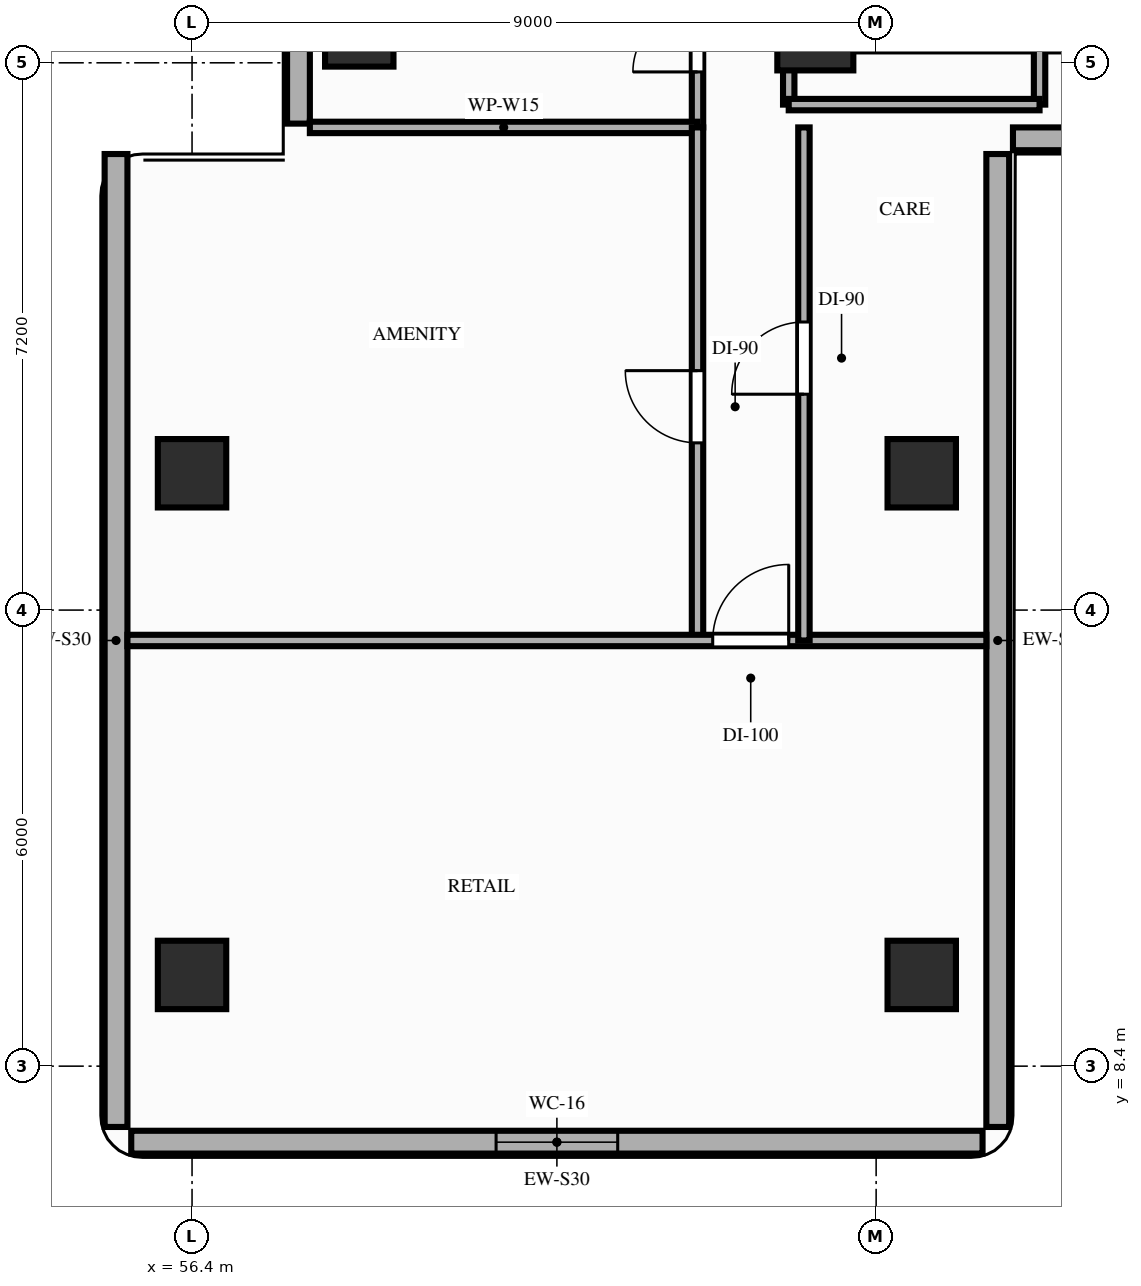
"""IFC4 building model, lengths in metres.
Left out: names, types, materials, properties, quantities, classifications, styles, units other than length and angle.
Written with IfcOpenShell. Run it as: python <this file> out.ifc"""

import sys

from ifc_helpers import new_model, si_unit, direction, frame, frame_2d, origin, origin_2d, place, context, subcontext, project, spatial, rectangle, extrude, element, fill, save


model = new_model("IFC4")
c1 = context("Model", 3, precision=1e-05, world=origin(), true_north=direction((0.0, 1.0)))
c2 = subcontext(c1, "Body", "Model", "MODEL_VIEW")
j1 = project(units=[si_unit("LENGTHUNIT", "METRE"), si_unit("PLANEANGLEUNIT", "RADIAN")], contexts=[c1])
p1 = place(None, origin())
s1 = spatial("IfcSite", under=j1, at=p1, CompositionType="ELEMENT")
p2 = place(p1, origin())
s2 = spatial("IfcBuilding", under=s1, at=p2, CompositionType="ELEMENT")
p3 = place(p2, frame((0.0, 0.0, 72.4)))
s3 = spatial("IfcBuildingStorey", under=s2, at=p3, CompositionType="ELEMENT", Elevation=72.4)
p4 = place(p3, frame((64.6, 22.0, 0.0), z_axis=(0.0, 0.0, 1.0), x_axis=(1.0, 0.0, 0.0)))
e1 = element("IfcColumn", 1, at=p4, inside=s3, PredefinedType="COLUMN", context=c2, shape_type="SweptSolid", body=[
    extrude(rectangle(XDim=1.0, YDim=1.0, at=origin_2d()), origin(), (0.0, 0.0, 1.0), 3.2),
])
for number, where, z_axis, x_axis in (
    (2, (58.6, 22.0, 0.0), (0.0, 0.0, 1.0), (1.0, 0.0, 0.0)),
    (3, (56.4, 9.6, 0.0), (0.0, 0.0, 1.0), (1.0, 0.0, 0.0)),
    (4, (56.4, 16.2, 0.0), (0.0, 0.0, 1.0), (1.0, 0.0, 0.0)),
    (5, (66.0, 9.6, 0.0), (0.0, 0.0, 1.0), (1.0, 0.0, 0.0)),
    (6, (66.0, 16.2, 0.0), (0.0, 0.0, 1.0), (1.0, 0.0, 0.0)),
):
    element("IfcColumn", number, at=place(p3, frame(where, z_axis=z_axis, x_axis=x_axis)), inside=s3, PredefinedType="COLUMN", context=c2, shape_type="SweptSolid", body=[
        extrude(rectangle(XDim=0.9, YDim=0.9, at=origin_2d()), origin(), (0.0, 0.0, 1.0), 3.2),
    ])
p5 = place(p3, frame((57.8, 43.4, 0.0), z_axis=(0.0, 0.0, 1.0), x_axis=(0.0, -1.0, 0.0)))
e7 = element("IfcWall", 7, at=p5, inside=s3, PredefinedType="STANDARD", context=c2, shape_type="SweptSolid", body=[
    extrude(rectangle(XDim=22.6, YDim=0.3, at=frame_2d((11.3, 0.0))), origin(), (0.0, 0.0, 1.0), 2.54),
])
p6 = place(p3, frame((55.6, 7.4, 0.0), z_axis=(0.0, 0.0, 1.0), x_axis=(1.0, 0.0, 0.0)))
e8 = element("IfcWall", 8, at=p6, inside=s3, PredefinedType="STANDARD", context=c2, shape_type="SweptSolid", body=[
    extrude(rectangle(XDim=11.2, YDim=0.3, at=frame_2d((5.6, 0.0))), origin(), (0.0, 0.0, 1.0), 2.96),
])
p7 = place(p6, frame((4.8, 0.0, 0.85)))
e9 = element("IfcOpeningElement", 9, at=p7, cuts=e8, PredefinedType="OPENING", context=c2, shape_type="SweptSolid", body=[
    extrude(rectangle(XDim=1.6, YDim=1.7, at=frame_2d((0.8, 0.85))), frame((0.0, 0.16, 0.0), z_axis=(0.0, -1.0, 0.0), x_axis=(1.0, 0.0, 0.0)), (0.0, 0.0, 1.0), 0.32),
])
for number, where, z_axis, x_axis in (
    (10, (55.4, 20.4, 0.0), (0.0, 0.0, 1.0), (0.0, -1.0, 0.0)),
    (11, (67.0, 7.6, 0.0), (0.0, 0.0, 1.0), (0.0, 1.0, 0.0)),
):
    element("IfcWall", number, at=place(p3, frame(where, z_axis=z_axis, x_axis=x_axis)), inside=s3, PredefinedType="STANDARD", context=c2, shape_type="SweptSolid", body=[
        extrude(rectangle(XDim=12.8, YDim=0.3, at=frame_2d((6.4, 0.0))), origin(), (0.0, 0.0, 1.0), 2.96),
    ])
p8 = place(p3, frame((67.2, 20.6, 0.0), z_axis=(0.0, 0.0, 1.0), x_axis=(1.0, 0.0, 0.0)))
e12 = element("IfcWall", 12, at=p8, inside=s3, PredefinedType="STANDARD", context=c2, shape_type="SweptSolid", body=[
    extrude(rectangle(XDim=5.6, YDim=0.3, at=frame_2d((2.8, 0.0))), origin(), (0.0, 0.0, 1.0), 2.96),
])
p9 = place(p3, frame((64.25, 21.05, 0.0), z_axis=(0.0, 0.0, 1.0), x_axis=(0.0, 1.0, 0.0)))
e13 = element("IfcWall", 13, at=p9, inside=s3, PredefinedType="PARTITIONING", context=c2, shape_type="SweptSolid", body=[
    extrude(rectangle(XDim=6.55, YDim=0.15, at=frame_2d((3.275, 0.0))), origin(), (0.0, 0.0, 1.0), 2.54),
])
p10 = place(p9, frame((3.1, 0.0, 0.0)))
e14 = element("IfcOpeningElement", 14, at=p10, cuts=e13, PredefinedType="OPENING", context=c2, shape_type="SweptSolid", body=[
    extrude(rectangle(XDim=0.95, YDim=2.15, at=frame_2d((0.475, 1.075))), frame((0.0, 0.085, 0.0), z_axis=(0.0, -1.0, 0.0), x_axis=(1.0, 0.0, 0.0)), (0.0, 0.0, 1.0), 0.17),
])
p11 = place(p3, frame((67.55, 21.05, 0.0), z_axis=(0.0, 0.0, 1.0), x_axis=(0.0, 1.0, 0.0)))
e15 = element("IfcWall", 15, at=p11, inside=s3, PredefinedType="PARTITIONING", context=c2, shape_type="SweptSolid", body=[
    extrude(rectangle(XDim=6.47, YDim=0.15, at=frame_2d((3.235, 0.0))), origin(), (0.0, 0.0, 1.0), 2.54),
])
p12 = place(p3, frame((64.25, 21.05, 0.0), z_axis=(0.0, 0.0, 1.0), x_axis=(1.0, 0.0, 0.0)))
e16 = element("IfcWall", 16, at=p12, inside=s3, PredefinedType="PARTITIONING", context=c2, shape_type="SweptSolid", body=[
    extrude(rectangle(XDim=3.3, YDim=0.15, at=frame_2d((1.65, 0.0))), origin(), (0.0, 0.0, 1.0), 2.54),
])
p13 = place(p3, frame((63.05, 20.75, 0.0), z_axis=(0.0, 0.0, 1.0), x_axis=(0.0, 1.0, 0.0)))
e17 = element("IfcWall", 17, at=p13, inside=s3, PredefinedType="PARTITIONING", context=c2, shape_type="SweptSolid", body=[
    extrude(rectangle(XDim=22.7, YDim=0.15, at=frame_2d((11.35, 0.0))), origin(), (0.0, 0.0, 1.0), 2.54),
])
p14 = place(p13, frame((0.73, 0.0, 0.0)))
e18 = element("IfcOpeningElement", 18, at=p14, cuts=e17, PredefinedType="OPENING", context=c2, shape_type="SweptSolid", body=[
    extrude(rectangle(XDim=0.85, YDim=2.1, at=frame_2d((0.425, 1.05))), frame((0.0, 0.085, 0.0), z_axis=(0.0, -1.0, 0.0), x_axis=(1.0, 0.0, 0.0)), (0.0, 0.0, 1.0), 0.17),
])
p15 = place(p13, frame((3.43, 0.0, 0.0)))
e19 = element("IfcOpeningElement", 19, at=p15, cuts=e17, PredefinedType="OPENING", context=c2, shape_type="SweptSolid", body=[
    extrude(rectangle(XDim=0.95, YDim=2.1, at=frame_2d((0.475, 1.05))), frame((0.0, 0.085, 0.0), z_axis=(0.0, -1.0, 0.0), x_axis=(1.0, 0.0, 0.0)), (0.0, 0.0, 1.0), 0.17),
])
p16 = place(p13, frame((8.15, 0.0, 0.0)))
e20 = element("IfcOpeningElement", 20, at=p16, cuts=e17, PredefinedType="OPENING", context=c2, shape_type="SweptSolid", body=[
    extrude(rectangle(XDim=0.95, YDim=2.15, at=frame_2d((0.475, 1.075))), frame((0.0, 0.085, 0.0), z_axis=(0.0, -1.0, 0.0), x_axis=(1.0, 0.0, 0.0)), (0.0, 0.0, 1.0), 0.17),
])
p17 = place(p13, frame((13.67, 0.0, 0.0)))
e21 = element("IfcOpeningElement", 21, at=p17, cuts=e17, PredefinedType="OPENING", context=c2, shape_type="SweptSolid", body=[
    extrude(rectangle(XDim=0.95, YDim=2.15, at=frame_2d((0.475, 1.075))), frame((0.0, 0.085, 0.0), z_axis=(0.0, -1.0, 0.0), x_axis=(1.0, 0.0, 0.0)), (0.0, 0.0, 1.0), 0.17),
])
p18 = place(p13, frame((19.47, 0.0, 0.0)))
e22 = element("IfcOpeningElement", 22, at=p18, cuts=e17, PredefinedType="OPENING", context=c2, shape_type="SweptSolid", body=[
    extrude(rectangle(XDim=0.95, YDim=2.15, at=frame_2d((0.475, 1.075))), frame((0.0, 0.085, 0.0), z_axis=(0.0, -1.0, 0.0), x_axis=(1.0, 0.0, 0.0)), (0.0, 0.0, 1.0), 0.17),
])
p19 = place(p3, frame((57.95, 20.75, 0.0), z_axis=(0.0, 0.0, 1.0), x_axis=(1.0, 0.0, 0.0)))
e23 = element("IfcWall", 23, at=p19, inside=s3, PredefinedType="PARTITIONING", context=c2, shape_type="SweptSolid", body=[
    extrude(rectangle(XDim=5.1, YDim=0.15, at=frame_2d((2.55, 0.0))), origin(), (0.0, 0.0, 1.0), 2.54),
])
p20 = place(p3, frame((63.05, 14.0, 0.0), z_axis=(0.0, 0.0, 1.0), x_axis=(0.0, 1.0, 0.0)))
e24 = element("IfcWall", 24, at=p20, inside=s3, PredefinedType="PARTITIONING", context=c2, shape_type="SweptSolid", body=[
    extrude(rectangle(XDim=6.75, YDim=0.15, at=frame_2d((3.375, 0.0))), origin(), (0.0, 0.0, 1.0), 2.54),
])
p21 = place(p20, frame((2.6, 0.0, 0.0)))
e25 = element("IfcOpeningElement", 25, at=p21, cuts=e24, PredefinedType="OPENING", context=c2, shape_type="SweptSolid", body=[
    extrude(rectangle(XDim=0.95, YDim=2.15, at=frame_2d((0.475, 1.075))), frame((0.0, 0.085, 0.0), z_axis=(0.0, -1.0, 0.0), x_axis=(1.0, 0.0, 0.0)), (0.0, 0.0, 1.0), 0.17),
])
p22 = place(p3, frame((55.55, 14.0, 0.0), z_axis=(0.0, 0.0, 1.0), x_axis=(1.0, 0.0, 0.0)))
e26 = element("IfcWall", 26, at=p22, inside=s3, PredefinedType="PARTITIONING", context=c2, shape_type="SweptSolid", body=[
    extrude(rectangle(XDim=11.3, YDim=0.15, at=frame_2d((5.65, 0.0))), origin(), (0.0, 0.0, 1.0), 2.54),
])
p23 = place(p22, frame((7.7, 0.0, 0.0)))
e27 = element("IfcOpeningElement", 27, at=p23, cuts=e26, PredefinedType="OPENING", context=c2, shape_type="SweptSolid", body=[
    extrude(rectangle(XDim=1.0, YDim=2.15, at=frame_2d((0.5, 1.075))), frame((0.0, 0.085, 0.0), z_axis=(0.0, -1.0, 0.0), x_axis=(1.0, 0.0, 0.0)), (0.0, 0.0, 1.0), 0.17),
])
p24 = place(p3, frame((64.45, 14.0, 0.0), z_axis=(0.0, 0.0, 1.0), x_axis=(0.0, 1.0, 0.0)))
e28 = element("IfcWall", 28, at=p24, inside=s3, PredefinedType="PARTITIONING", context=c2, shape_type="SweptSolid", body=[
    extrude(rectangle(XDim=6.75, YDim=0.15, at=frame_2d((3.375, 0.0))), origin(), (0.0, 0.0, 1.0), 2.54),
])
p25 = place(p24, frame((3.24, 0.0, 0.0)))
e29 = element("IfcOpeningElement", 29, at=p25, cuts=e28, PredefinedType="OPENING", context=c2, shape_type="SweptSolid", body=[
    extrude(rectangle(XDim=0.95, YDim=2.15, at=frame_2d((0.475, 1.075))), frame((0.0, 0.085, 0.0), z_axis=(0.0, -1.0, 0.0), x_axis=(1.0, 0.0, 0.0)), (0.0, 0.0, 1.0), 0.17),
])
p26 = place(p7, origin())
e30 = element("IfcWindow", 30, at=p26, inside=s3, PartitioningType="SINGLE_PANEL", PredefinedType="WINDOW", context=c2, shape_type="SweptSolid", body=[
    extrude(rectangle(XDim=1.6, YDim=1.7, at=frame_2d((0.8, 0.85))), frame((0.0, 0.03, 0.0), z_axis=(0.0, -1.0, 0.0), x_axis=(1.0, 0.0, 0.0)), (0.0, 0.0, 1.0), 0.06),
])
fill(e9, e30)
p27 = place(p14, origin())
e31 = element("IfcDoor", 31, at=p27, inside=s3, OperationType="SINGLE_SWING_LEFT", PredefinedType="DOOR", context=c2, shape_type="SweptSolid", body=[
    extrude(rectangle(XDim=0.85, YDim=2.1, at=frame_2d((0.425, 1.05))), frame((0.0, 0.025, 0.0), z_axis=(0.0, -1.0, 0.0), x_axis=(1.0, 0.0, 0.0)), (0.0, 0.0, 1.0), 0.05),
])
fill(e18, e31)
p28 = place(p21, origin())
e32 = element("IfcDoor", 32, at=p28, inside=s3, OperationType="SINGLE_SWING_RIGHT", PredefinedType="DOOR", context=c2, shape_type="SweptSolid", body=[
    extrude(rectangle(XDim=0.95, YDim=2.15, at=frame_2d((0.475, 1.075))), frame((0.0, 0.025, 0.0), z_axis=(0.0, -1.0, 0.0), x_axis=(1.0, 0.0, 0.0)), (0.0, 0.0, 1.0), 0.05),
])
fill(e25, e32)
p29 = place(p25, origin())
e33 = element("IfcDoor", 33, at=p29, inside=s3, OperationType="SINGLE_SWING_LEFT", PredefinedType="DOOR", context=c2, shape_type="SweptSolid", body=[
    extrude(rectangle(XDim=0.95, YDim=2.15, at=frame_2d((0.475, 1.075))), frame((0.0, 0.025, 0.0), z_axis=(0.0, -1.0, 0.0), x_axis=(1.0, 0.0, 0.0)), (0.0, 0.0, 1.0), 0.05),
])
fill(e29, e33)
p30 = place(p23, origin())
e34 = element("IfcDoor", 34, at=p30, inside=s3, OperationType="SINGLE_SWING_RIGHT", PredefinedType="DOOR", context=c2, shape_type="SweptSolid", body=[
    extrude(rectangle(XDim=1.0, YDim=2.15, at=frame_2d((0.5, 1.075))), frame((0.0, 0.025, 0.0), z_axis=(0.0, -1.0, 0.0), x_axis=(1.0, 0.0, 0.0)), (0.0, 0.0, 1.0), 0.05),
])
fill(e27, e34)
save(model, sys.argv[1])
